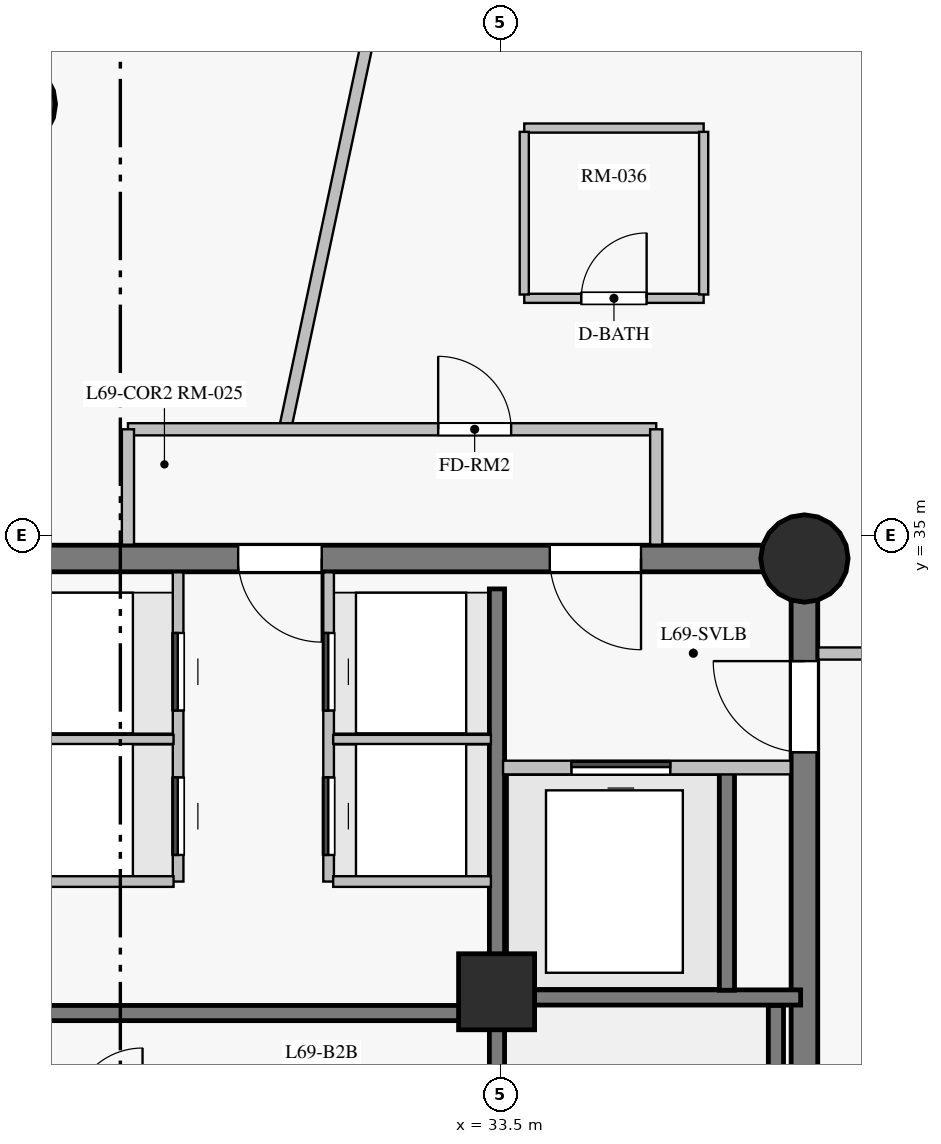
"""IFC4 building model, lengths in metres.
Left out: names, types, materials, properties, quantities, classifications, styles, units other than length and angle.
Written with IfcOpenShell. Run it as: python <this file> out.ifc"""

import sys

from ifc_helpers import new_model, si_unit, direction, frame, frame_2d, origin, origin_with_axes, origin_2d, place, context, subcontext, project, spatial, rectangle, circle, extrude, source, transform, mapped, element, fill, save


model = new_model("IFC4")
c1 = context("Model", 3, precision=1e-05, world=origin(), true_north=direction((0.0, 1.0)))
c2 = subcontext(c1, "Body", "Model", "MODEL_VIEW")
j1 = project(units=[si_unit("LENGTHUNIT", "METRE"), si_unit("PLANEANGLEUNIT", "RADIAN")], contexts=[c1])
p1 = place(None, origin())
s1 = spatial("IfcSite", under=j1, at=p1, CompositionType="ELEMENT")
p2 = place(p1, origin())
s2 = spatial("IfcBuilding", under=s1, at=p2, CompositionType="ELEMENT")
p3 = place(p2, frame((0.0, 0.0, 235.2)))
s3 = spatial("IfcBuildingStorey", under=s2, at=p3, CompositionType="ELEMENT", Elevation=235.2)
p4 = place(p3, frame((37.5, 18.3, 0.0), z_axis=(0.0, 0.0, 1.0), x_axis=(0.0, 1.0, 0.0)))
e1 = element("IfcWall", 1, at=p4, inside=s3, PredefinedType="SHEAR", context=c2, shape_type="SweptSolid", body=[
    extrude(rectangle(XDim=16.4, YDim=0.35, at=frame_2d((8.2, 0.0))), origin(), (0.0, 0.0, 1.0), 2.85),
])
p5 = place(p4, frame((13.85, 0.0, 0.0)))
e2 = element("IfcOpeningElement", 2, at=p5, cuts=e1, PredefinedType="OPENING", context=c2, shape_type="SweptSolid", body=[
    extrude(rectangle(XDim=1.2, YDim=2.15, at=frame_2d((0.6, 1.075))), frame((0.0, 0.185, 0.0), z_axis=(0.0, -1.0, 0.0), x_axis=(1.0, 0.0, 0.0)), (0.0, 0.0, 1.0), 0.37),
])
p6 = place(p3, frame((37.5, 34.7, 0.0), z_axis=(0.0, 0.0, 1.0), x_axis=(-1.0, 0.0, 0.0)))
e3 = element("IfcWall", 3, at=p6, inside=s3, PredefinedType="SHEAR", context=c2, shape_type="SweptSolid", body=[
    extrude(rectangle(XDim=10.95, YDim=0.35, at=frame_2d((5.475, 0.0))), origin(), (0.0, 0.0, 1.0), 2.85),
])
p7 = place(p6, frame((2.15, 0.0, 0.0)))
e4 = element("IfcOpeningElement", 4, at=p7, cuts=e3, PredefinedType="OPENING", context=c2, shape_type="SweptSolid", body=[
    extrude(rectangle(XDim=1.2, YDim=2.15, at=frame_2d((0.6, 1.075))), frame((0.0, 0.185, 0.0), z_axis=(0.0, -1.0, 0.0), x_axis=(1.0, 0.0, 0.0)), (0.0, 0.0, 1.0), 0.37),
])
p8 = place(p6, frame((6.35, 0.0, 0.0)))
e5 = element("IfcOpeningElement", 5, at=p8, cuts=e3, PredefinedType="OPENING", context=c2, shape_type="SweptSolid", body=[
    extrude(rectangle(XDim=1.1, YDim=2.15, at=frame_2d((0.55, 1.075))), frame((0.0, 0.185, 0.0), z_axis=(0.0, -1.0, 0.0), x_axis=(1.0, 0.0, 0.0)), (0.0, 0.0, 1.0), 0.37),
])
m1 = source(origin_with_axes(), c2, "Body", "SweptSolid", [
    extrude(circle(Radius=0.575, at=origin_2d()), origin(), (0.0, 0.0, 1.0), 3.05),
])
p9 = place(p3, frame((37.5, 34.7, 0.0), z_axis=(0.0, 0.0, 1.0), x_axis=(1.0, 0.0, 0.0)))
e6 = element("IfcColumn", 6, at=p9, inside=s3, PredefinedType="COLUMN", context=c2, shape_type="MappedRepresentation", body=[
    mapped(m1, transform((0.0, 0.0, 0.0), scale=1.0)),
])
m2 = source(origin_with_axes(), c2, "Body", "SweptSolid", [
    extrude(rectangle(XDim=1.0, YDim=1.0, at=origin_2d()), origin(), (0.0, 0.0, 1.0), 3.05),
])
p10 = place(p3, frame((33.45, 29.0, 0.0), z_axis=(0.0, 0.0, 1.0), x_axis=(1.0, 0.0, 0.0)))
e7 = element("IfcColumn", 7, at=p10, inside=s3, PredefinedType="COLUMN", context=c2, shape_type="MappedRepresentation", body=[
    mapped(m2, transform((0.0, 0.0, 0.0), scale=1.0)),
])
p11 = place(p3, frame((27.073, 40.677, 0.0), z_axis=(0.0, 0.0, 1.0), x_axis=(1.0, 0.0, 0.0)))
e8 = element("IfcColumn", 8, at=p11, inside=s3, PredefinedType="COLUMN", context=c2, shape_type="MappedRepresentation", body=[
    mapped(m1, transform((0.0, 0.0, 0.0), scale=1.0)),
])
p12 = place(p3, frame((43.854, 36.163, 0.0), z_axis=(0.0, 0.0, 1.0), x_axis=(-0.561648682989, 0.827375825666, 0.0)))
e9 = element("IfcWall", 9, at=p12, inside=s3, PredefinedType="SOLIDWALL", context=c2, shape_type="SweptSolid", body=[
    extrude(rectangle(XDim=11.878, YDim=0.28, at=frame_2d((5.939, 0.0))), origin(), (0.0, 0.0, 1.0), 2.85),
])
p13 = place(p12, frame((1.433, 0.0, 0.85)))
e10 = element("IfcOpeningElement", 10, at=p13, cuts=e9, PredefinedType="OPENING", context=c2, shape_type="SweptSolid", body=[
    extrude(rectangle(XDim=1.6, YDim=1.6, at=frame_2d((0.8, 0.8))), frame((0.0, 0.15, 0.0), z_axis=(0.0, -1.0, 0.0), x_axis=(1.0, 0.0, 0.0)), (0.0, 0.0, 1.0), 0.3),
])
p14 = place(p12, frame((5.139, 0.0, 0.85)))
e11 = element("IfcOpeningElement", 11, at=p14, cuts=e9, PredefinedType="OPENING", context=c2, shape_type="SweptSolid", body=[
    extrude(rectangle(XDim=1.6, YDim=1.6, at=frame_2d((0.8, 0.8))), frame((0.0, 0.15, 0.0), z_axis=(0.0, -1.0, 0.0), x_axis=(1.0, 0.0, 0.0)), (0.0, 0.0, 1.0), 0.3),
])
p15 = place(p12, frame((8.845, 0.0, 0.85)))
e12 = element("IfcOpeningElement", 12, at=p15, cuts=e9, PredefinedType="OPENING", context=c2, shape_type="SweptSolid", body=[
    extrude(rectangle(XDim=1.6, YDim=1.6, at=frame_2d((0.8, 0.8))), frame((0.0, 0.15, 0.0), z_axis=(0.0, -1.0, 0.0), x_axis=(1.0, 0.0, 0.0)), (0.0, 0.0, 1.0), 0.3),
])
p16 = place(p3, frame((33.455, 18.7, 0.0), z_axis=(0.0, 0.0, 1.0), x_axis=(0.0, 1.0, 0.0)))
e13 = element("IfcWall", 13, at=p16, inside=s3, PredefinedType="SHEAR", context=c2, shape_type="SweptSolid", body=[
    extrude(rectangle(XDim=15.6, YDim=0.2, at=frame_2d((7.8, 0.0))), origin(), (0.0, 0.0, 1.0), 2.85),
])
p17 = place(p16, frame((2.75, 0.0, 0.0)))
e14 = element("IfcOpeningElement", 14, at=p17, cuts=e13, PredefinedType="OPENING", context=c2, shape_type="SweptSolid", body=[
    extrude(rectangle(XDim=1.15, YDim=2.15, at=frame_2d((0.575, 1.075))), frame((0.0, 0.11, 0.0), z_axis=(0.0, -1.0, 0.0), x_axis=(1.0, 0.0, 0.0)), (0.0, 0.0, 1.0), 0.22),
])
p18 = place(p16, frame((0.55, 0.0, 0.0)))
e15 = element("IfcOpeningElement", 15, at=p18, cuts=e13, PredefinedType="OPENING", context=c2, shape_type="SweptSolid", body=[
    extrude(rectangle(XDim=0.94, YDim=2.1, at=frame_2d((0.47, 1.05))), frame((0.0, 0.11, 0.0), z_axis=(0.0, -1.0, 0.0), x_axis=(1.0, 0.0, 0.0)), (0.0, 0.0, 1.0), 0.22),
])
p19 = place(p3, frame((23.7, 28.72, 0.0), z_axis=(0.0, 0.0, 1.0), x_axis=(1.0, 0.0, 0.0)))
e16 = element("IfcWall", 16, at=p19, inside=s3, PredefinedType="SHEAR", context=c2, shape_type="SweptSolid", body=[
    extrude(rectangle(XDim=9.6, YDim=0.2, at=frame_2d((4.8, 0.0))), origin(), (0.0, 0.0, 1.0), 2.85),
])
p20 = place(p19, frame((2.4, 0.0, 0.0)))
e17 = element("IfcOpeningElement", 17, at=p20, cuts=e16, PredefinedType="OPENING", context=c2, shape_type="SweptSolid", body=[
    extrude(rectangle(XDim=1.0, YDim=2.15, at=frame_2d((0.5, 1.075))), frame((0.0, 0.11, 0.0), z_axis=(0.0, -1.0, 0.0), x_axis=(1.0, 0.0, 0.0)), (0.0, 0.0, 1.0), 0.22),
])
p21 = place(p3, frame((37.125, 21.32, 0.0), z_axis=(0.0, 0.0, 1.0), x_axis=(0.0, 1.0, 0.0)))
e18 = element("IfcWall", 18, at=p21, inside=s3, PredefinedType="SHEAR", context=c2, shape_type="SweptSolid", body=[
    extrude(rectangle(XDim=7.5, YDim=0.2, at=frame_2d((3.75, 0.0))), origin(), (0.0, 0.0, 1.0), 2.85),
])
p22 = place(p3, frame((33.455, 28.925, 0.0), z_axis=(0.0, 0.0, 1.0), x_axis=(1.0, 0.0, 0.0)))
e19 = element("IfcWall", 19, at=p22, inside=s3, PredefinedType="SHEAR", context=c2, shape_type="SweptSolid", body=[
    extrude(rectangle(XDim=3.995, YDim=0.2, at=frame_2d((1.998, 0.0))), origin(), (0.0, 0.0, 1.0), 2.85),
])
p23 = place(p3, frame((36.48, 29.02, 0.0), z_axis=(0.0, 0.0, 1.0), x_axis=(0.0, 1.0, 0.0)))
e20 = element("IfcWall", 20, at=p23, inside=s3, PredefinedType="SHEAR", context=c2, shape_type="SweptSolid", body=[
    extrude(rectangle(XDim=2.86, YDim=0.2, at=frame_2d((1.43, 0.0))), origin(), (0.0, 0.0, 1.0), 2.85),
])
p24 = place(p3, frame((30.659, 36.371, 0.0), z_axis=(0.0, 0.0, 1.0), x_axis=(0.207921550164, 0.978145505013, 0.0)))
e21 = element("IfcWall", 21, at=p24, inside=s3, PredefinedType="PARTITIONING", context=c2, shape_type="SweptSolid", body=[
    extrude(rectangle(XDim=10.602, YDim=0.16, at=frame_2d((5.301, 0.0))), origin(), (0.0, 0.0, 1.0), 2.85),
])
p25 = place(p3, frame((28.6, 36.4, 0.0), z_axis=(0.0, 0.0, 1.0), x_axis=(1.0, 0.0, 0.0)))
e22 = element("IfcWall", 22, at=p25, inside=s3, PredefinedType="PARTITIONING", context=c2, shape_type="SweptSolid", body=[
    extrude(rectangle(XDim=6.95, YDim=0.16, at=frame_2d((3.475, 0.0))), origin(), (0.0, 0.0, 1.0), 2.45),
])
p26 = place(p25, frame((4.081, 0.0, 0.0)))
e23 = element("IfcOpeningElement", 23, at=p26, cuts=e22, PredefinedType="OPENING", context=c2, shape_type="SweptSolid", body=[
    extrude(rectangle(XDim=0.96, YDim=2.15, at=frame_2d((0.48, 1.075))), frame((0.0, 0.09, 0.0), z_axis=(0.0, -1.0, 0.0), x_axis=(1.0, 0.0, 0.0)), (0.0, 0.0, 1.0), 0.18),
])
p27 = place(p3, frame((37.682, 33.45, 0.0), z_axis=(0.0, 0.0, 1.0), x_axis=(1.0, 0.0, 0.0)))
e24 = element("IfcWall", 24, at=p27, inside=s3, PredefinedType="PARTITIONING", context=c2, shape_type="SweptSolid", body=[
    extrude(rectangle(XDim=4.118, YDim=0.16, at=frame_2d((2.059, 0.0))), origin(), (0.0, 0.0, 1.0), 2.85),
])
p28 = place(p3, frame((29.26, 30.45, 0.0), z_axis=(0.0, 0.0, 1.0), x_axis=(0.0, 1.0, 0.0)))
e25 = element("IfcWall", 25, at=p28, inside=s3, PredefinedType="PARTITIONING", context=c2, shape_type="SweptSolid", body=[
    extrude(rectangle(XDim=4.068, YDim=0.14, at=frame_2d((2.034, 0.0))), origin(), (0.0, 0.0, 1.0), 2.85),
])
p29 = place(p28, frame((0.35, 0.0, 0.0)))
e26 = element("IfcOpeningElement", 26, at=p29, cuts=e25, PredefinedType="OPENING", context=c2, shape_type="SweptSolid", body=[
    extrude(rectangle(XDim=1.02, YDim=2.15, at=frame_2d((0.51, 1.075))), frame((0.0, 0.08, 0.0), z_axis=(0.0, -1.0, 0.0), x_axis=(1.0, 0.0, 0.0)), (0.0, 0.0, 1.0), 0.16),
])
p30 = place(p28, frame((2.25, 0.0, 0.0)))
e27 = element("IfcOpeningElement", 27, at=p30, cuts=e25, PredefinedType="OPENING", context=c2, shape_type="SweptSolid", body=[
    extrude(rectangle(XDim=1.02, YDim=2.15, at=frame_2d((0.51, 1.075))), frame((0.0, 0.08, 0.0), z_axis=(0.0, -1.0, 0.0), x_axis=(1.0, 0.0, 0.0)), (0.0, 0.0, 1.0), 0.16),
])
p31 = place(p3, frame((31.24, 30.45, 0.0), z_axis=(0.0, 0.0, 1.0), x_axis=(0.0, 1.0, 0.0)))
e28 = element("IfcWall", 28, at=p31, inside=s3, PredefinedType="PARTITIONING", context=c2, shape_type="SweptSolid", body=[
    extrude(rectangle(XDim=4.068, YDim=0.14, at=frame_2d((2.034, 0.0))), origin(), (0.0, 0.0, 1.0), 2.85),
])
p32 = place(p31, frame((0.35, 0.0, 0.0)))
e29 = element("IfcOpeningElement", 29, at=p32, cuts=e28, PredefinedType="OPENING", context=c2, shape_type="SweptSolid", body=[
    extrude(rectangle(XDim=1.02, YDim=2.15, at=frame_2d((0.51, 1.075))), frame((0.0, 0.08, 0.0), z_axis=(0.0, -1.0, 0.0), x_axis=(1.0, 0.0, 0.0)), (0.0, 0.0, 1.0), 0.16),
])
p33 = place(p31, frame((2.25, 0.0, 0.0)))
e30 = element("IfcOpeningElement", 30, at=p33, cuts=e28, PredefinedType="OPENING", context=c2, shape_type="SweptSolid", body=[
    extrude(rectangle(XDim=1.02, YDim=2.15, at=frame_2d((0.51, 1.075))), frame((0.0, 0.08, 0.0), z_axis=(0.0, -1.0, 0.0), x_axis=(1.0, 0.0, 0.0)), (0.0, 0.0, 1.0), 0.16),
])
p34 = place(p3, frame((33.535, 31.95, 0.0), z_axis=(0.0, 0.0, 1.0), x_axis=(1.0, 0.0, 0.0)))
e31 = element("IfcWall", 31, at=p34, inside=s3, PredefinedType="PARTITIONING", context=c2, shape_type="SweptSolid", body=[
    extrude(rectangle(XDim=3.784, YDim=0.18, at=frame_2d((1.892, 0.0))), origin(), (0.0, 0.0, 1.0), 2.85),
])
p35 = place(p34, frame((0.9, 0.0, 0.0)))
e32 = element("IfcOpeningElement", 32, at=p35, cuts=e31, PredefinedType="OPENING", context=c2, shape_type="SweptSolid", body=[
    extrude(rectangle(XDim=1.3, YDim=2.2, at=frame_2d((0.65, 1.1))), frame((0.0, 0.1, 0.0), z_axis=(0.0, -1.0, 0.0), x_axis=(1.0, 0.0, 0.0)), (0.0, 0.0, 1.0), 0.2),
])
p36 = place(p3, frame((26.62, 30.45, 0.0), z_axis=(0.0, 0.0, 1.0), x_axis=(1.0, 0.0, 0.0)))
e33 = element("IfcWall", 33, at=p36, inside=s3, PredefinedType="PARTITIONING", context=c2, shape_type="SweptSolid", body=[
    extrude(rectangle(XDim=2.58, YDim=0.14, at=frame_2d((1.29, 0.0))), origin(), (0.0, 0.0, 1.0), 2.85),
])
p37 = place(p3, frame((26.62, 32.32, 0.0), z_axis=(0.0, 0.0, 1.0), x_axis=(1.0, 0.0, 0.0)))
e34 = element("IfcWall", 34, at=p37, inside=s3, PredefinedType="PARTITIONING", context=c2, shape_type="SweptSolid", body=[
    extrude(rectangle(XDim=2.58, YDim=0.12, at=frame_2d((1.29, 0.0))), origin(), (0.0, 0.0, 1.0), 2.85),
])
p38 = place(p3, frame((33.814, 38.123, 0.0), z_axis=(0.0, 0.0, 1.0), x_axis=(1.0, 0.0, 0.0)))
e35 = element("IfcWall", 35, at=p38, inside=s3, PredefinedType="PARTITIONING", context=c2, shape_type="SweptSolid", body=[
    extrude(rectangle(XDim=2.36, YDim=0.12, at=frame_2d((1.18, 0.0))), origin(), (0.0, 0.0, 1.0), 2.3),
])
p39 = place(p38, frame((0.75, 0.0, 0.0)))
e36 = element("IfcOpeningElement", 36, at=p39, cuts=e35, PredefinedType="OPENING", context=c2, shape_type="SweptSolid", body=[
    extrude(rectangle(XDim=0.86, YDim=2.1, at=frame_2d((0.43, 1.05))), frame((0.0, 0.07, 0.0), z_axis=(0.0, -1.0, 0.0), x_axis=(1.0, 0.0, 0.0)), (0.0, 0.0, 1.0), 0.14),
])
p40 = place(p3, frame((36.174, 40.363, 0.0), z_axis=(0.0, 0.0, 1.0), x_axis=(-1.0, 0.0, 0.0)))
e37 = element("IfcWall", 37, at=p40, inside=s3, PredefinedType="PARTITIONING", context=c2, shape_type="SweptSolid", body=[
    extrude(rectangle(XDim=2.36, YDim=0.12, at=frame_2d((1.18, 0.0))), origin(), (0.0, 0.0, 1.0), 2.85),
])
for number, where, z_axis, x_axis in (
    (38, (36.174, 38.173, 0.0), (0.0, 0.0, 1.0), (0.0, 1.0, 0.0)),
    (39, (33.814, 40.313, 0.0), (0.0, 0.0, 1.0), (0.0, -1.0, 0.0)),
):
    element("IfcWall", number, at=place(p3, frame(where, z_axis=z_axis, x_axis=x_axis)), inside=s3, PredefinedType="PARTITIONING", context=c2, shape_type="SweptSolid", body=[
        extrude(rectangle(XDim=2.14, YDim=0.12, at=frame_2d((1.07, 0.0))), origin(), (0.0, 0.0, 1.0), 2.85),
    ])
p41 = place(p3, frame((31.3, 30.45, 0.0), z_axis=(0.0, 0.0, 1.0), x_axis=(1.0, 0.0, 0.0)))
e40 = element("IfcWall", 40, at=p41, inside=s3, PredefinedType="PARTITIONING", context=c2, shape_type="SweptSolid", body=[
    extrude(rectangle(XDim=2.075, YDim=0.14, at=frame_2d((1.038, 0.0))), origin(), (0.0, 0.0, 1.0), 2.85),
])
p42 = place(p3, frame((31.3, 32.32, 0.0), z_axis=(0.0, 0.0, 1.0), x_axis=(1.0, 0.0, 0.0)))
e41 = element("IfcWall", 41, at=p42, inside=s3, PredefinedType="PARTITIONING", context=c2, shape_type="SweptSolid", body=[
    extrude(rectangle(XDim=2.075, YDim=0.12, at=frame_2d((1.038, 0.0))), origin(), (0.0, 0.0, 1.0), 2.85),
])
for number, where, z_axis, x_axis in (
    (42, (28.6, 34.882, 0.0), (0.0, 0.0, 1.0), (0.0, 1.0, 0.0)),
    (43, (35.55, 36.4, 0.0), (0.0, 0.0, 1.0), (0.0, -1.0, 0.0)),
):
    element("IfcWall", number, at=place(p3, frame(where, z_axis=z_axis, x_axis=x_axis)), inside=s3, PredefinedType="PARTITIONING", context=c2, shape_type="SweptSolid", body=[
        extrude(rectangle(XDim=1.518, YDim=0.16, at=frame_2d((0.759, 0.0))), origin(), (0.0, 0.0, 1.0), 2.85),
    ])
m3 = source(origin_with_axes(), c2, "Body", "SweptSolid", [
    extrude(rectangle(XDim=1.2, YDim=2.15, at=frame_2d((0.6, 1.075))), frame((0.0, 0.025, 0.0), z_axis=(0.0, -1.0, 0.0), x_axis=(1.0, 0.0, 0.0)), (0.0, 0.0, 1.0), 0.05),
])
p43 = place(p5, origin())
e44 = element("IfcDoor", 44, at=p43, inside=s3, OperationType="SINGLE_SWING_RIGHT", PredefinedType="DOOR", context=c2, shape_type="MappedRepresentation", body=[
    mapped(m3, transform((0.0, 0.0, 0.0), scale=1.0)),
])
fill(e2, e44)
p44 = place(p7, origin())
e45 = element("IfcDoor", 45, at=p44, inside=s3, OperationType="SINGLE_SWING_LEFT", PredefinedType="DOOR", context=c2, shape_type="MappedRepresentation", body=[
    mapped(m3, transform((0.0, 0.0, 0.0), scale=1.0)),
])
fill(e4, e45)
m4 = source(origin_with_axes(), c2, "Body", "SweptSolid", [
    extrude(rectangle(XDim=1.3, YDim=2.2, at=frame_2d((0.65, 1.1))), frame((0.0, 0.025, 0.0), z_axis=(0.0, -1.0, 0.0), x_axis=(1.0, 0.0, 0.0)), (0.0, 0.0, 1.0), 0.05),
])
p45 = place(p35, origin())
e46 = element("IfcDoor", 46, at=p45, inside=s3, OperationType="SLIDING_TO_LEFT", PredefinedType="DOOR", context=c2, shape_type="MappedRepresentation", body=[
    mapped(m4, transform((0.0, 0.0, 0.0), scale=1.0)),
])
fill(e32, e46)
m5 = source(origin_with_axes(), c2, "Body", "SweptSolid", [
    extrude(rectangle(XDim=1.1, YDim=2.15, at=frame_2d((0.55, 1.075))), frame((0.0, 0.025, 0.0), z_axis=(0.0, -1.0, 0.0), x_axis=(1.0, 0.0, 0.0)), (0.0, 0.0, 1.0), 0.05),
])
p46 = place(p8, origin())
e47 = element("IfcDoor", 47, at=p46, inside=s3, OperationType="SINGLE_SWING_LEFT", PredefinedType="DOOR", context=c2, shape_type="MappedRepresentation", body=[
    mapped(m5, transform((0.0, 0.0, 0.0), scale=1.0)),
])
fill(e5, e47)
m6 = source(origin_with_axes(), c2, "Body", "SweptSolid", [
    extrude(rectangle(XDim=1.02, YDim=2.15, at=frame_2d((0.51, 1.075))), frame((0.0, 0.025, 0.0), z_axis=(0.0, -1.0, 0.0), x_axis=(1.0, 0.0, 0.0)), (0.0, 0.0, 1.0), 0.05),
])
p47 = place(p29, origin())
e48 = element("IfcDoor", 48, at=p47, inside=s3, OperationType="SLIDING_TO_LEFT", PredefinedType="DOOR", context=c2, shape_type="MappedRepresentation", body=[
    mapped(m6, transform((0.0, 0.0, 0.0), scale=1.0)),
])
fill(e26, e48)
p48 = place(p30, origin())
e49 = element("IfcDoor", 49, at=p48, inside=s3, OperationType="SLIDING_TO_LEFT", PredefinedType="DOOR", context=c2, shape_type="MappedRepresentation", body=[
    mapped(m6, transform((0.0, 0.0, 0.0), scale=1.0)),
])
fill(e27, e49)
p49 = place(p32, origin())
e50 = element("IfcDoor", 50, at=p49, inside=s3, OperationType="SLIDING_TO_LEFT", PredefinedType="DOOR", context=c2, shape_type="MappedRepresentation", body=[
    mapped(m6, transform((0.0, 0.0, 0.0), scale=1.0)),
])
fill(e29, e50)
p50 = place(p33, origin())
e51 = element("IfcDoor", 51, at=p50, inside=s3, OperationType="SLIDING_TO_LEFT", PredefinedType="DOOR", context=c2, shape_type="MappedRepresentation", body=[
    mapped(m6, transform((0.0, 0.0, 0.0), scale=1.0)),
])
fill(e30, e51)
m7 = source(origin_with_axes(), c2, "Body", "SweptSolid", [
    extrude(rectangle(XDim=0.86, YDim=2.1, at=frame_2d((0.43, 1.05))), frame((0.0, 0.025, 0.0), z_axis=(0.0, -1.0, 0.0), x_axis=(1.0, 0.0, 0.0)), (0.0, 0.0, 1.0), 0.05),
])
p51 = place(p39, origin())
e52 = element("IfcDoor", 52, at=p51, inside=s3, OperationType="SINGLE_SWING_RIGHT", PredefinedType="DOOR", context=c2, shape_type="MappedRepresentation", body=[
    mapped(m7, transform((0.0, 0.0, 0.0), scale=1.0)),
])
fill(e36, e52)
m8 = source(origin_with_axes(), c2, "Body", "SweptSolid", [
    extrude(rectangle(XDim=0.96, YDim=2.15, at=frame_2d((0.48, 1.075))), frame((0.0, 0.025, 0.0), z_axis=(0.0, -1.0, 0.0), x_axis=(1.0, 0.0, 0.0)), (0.0, 0.0, 1.0), 0.05),
])
p52 = place(p26, origin())
e53 = element("IfcDoor", 53, at=p52, inside=s3, OperationType="SINGLE_SWING_LEFT", PredefinedType="DOOR", context=c2, shape_type="MappedRepresentation", body=[
    mapped(m8, transform((0.0, 0.0, 0.0), scale=1.0)),
])
fill(e23, e53)
save(model, sys.argv[1])
